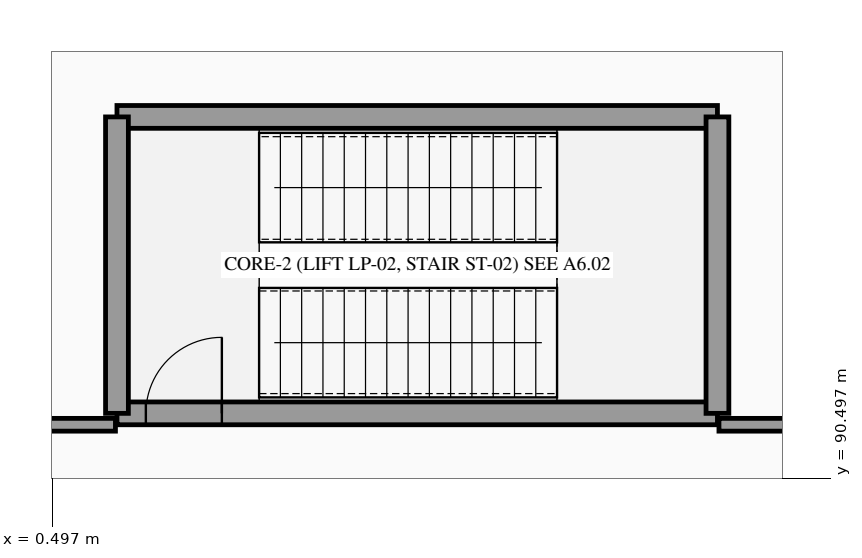
"""IFC4 building model, lengths in metres.
Left out: names, types, materials, properties, quantities, classifications, styles, units other than length and angle.
Written with IfcOpenShell. Run it as: python <this file> out.ifc"""

import sys

from ifc_helpers import new_model, si_unit, direction, frame, frame_2d, origin, place, context, subcontext, project, spatial, rectangle, extrude, element, fill, save


model = new_model("IFC4")
c1 = context("Model", 3, precision=1e-05, world=origin(), true_north=direction((0.0, 1.0)))
c2 = subcontext(c1, "Body", "Model", "MODEL_VIEW")
j1 = project(units=[si_unit("LENGTHUNIT", "METRE"), si_unit("PLANEANGLEUNIT", "RADIAN")], contexts=[c1])
p1 = place(None, origin())
s1 = spatial("IfcSite", under=j1, at=p1, CompositionType="ELEMENT")
p2 = place(p1, origin())
s2 = spatial("IfcBuilding", under=s1, at=p2, CompositionType="ELEMENT")
p3 = place(p2, origin())
s3 = spatial("IfcBuildingStorey", under=s2, at=p3, CompositionType="ELEMENT", Elevation=0.0)
p4 = place(p3, frame((1.35, 91.35, 0.0), z_axis=(0.0, 0.0, 1.0), x_axis=(1.0, 0.0, 0.0)))
e1 = element("IfcWall", 1, at=p4, inside=s3, PredefinedType="SHEAR", context=c2, shape_type="SweptSolid", body=[
    extrude(rectangle(XDim=7.9, YDim=0.3, at=frame_2d((3.95, 0.0))), origin(), (0.0, 0.0, 1.0), 5.4),
])
p5 = place(p4, frame((0.38, 0.0, 0.0)))
e2 = element("IfcOpeningElement", 2, at=p5, cuts=e1, PredefinedType="OPENING", context=c2, shape_type="SweptSolid", body=[
    extrude(rectangle(XDim=1.0, YDim=2.15, at=frame_2d((0.5, 1.075))), frame((0.0, 0.16, 0.0), z_axis=(0.0, -1.0, 0.0), x_axis=(1.0, 0.0, 0.0)), (0.0, 0.0, 1.0), 0.32),
])
p6 = place(p3, frame((1.35, 95.25, 0.0), z_axis=(0.0, 0.0, 1.0), x_axis=(1.0, 0.0, 0.0)))
e3 = element("IfcWall", 3, at=p6, inside=s3, PredefinedType="SHEAR", context=c2, shape_type="SweptSolid", body=[
    extrude(rectangle(XDim=7.9, YDim=0.3, at=frame_2d((3.95, 0.0))), origin(), (0.0, 0.0, 1.0), 5.4),
])
for number, where, z_axis, x_axis in (
    (4, (1.35, 91.35, 0.0), (0.0, 0.0, 1.0), (0.0, 1.0, 0.0)),
    (5, (9.25, 91.35, 0.0), (0.0, 0.0, 1.0), (0.0, 1.0, 0.0)),
):
    element("IfcWall", number, at=place(p3, frame(where, z_axis=z_axis, x_axis=x_axis)), inside=s3, PredefinedType="SHEAR", context=c2, shape_type="SweptSolid", body=[
        extrude(rectangle(XDim=3.9, YDim=0.3, at=frame_2d((1.95, 0.0))), origin(), (0.0, 0.0, 1.0), 5.4),
    ])
p7 = place(p3, frame((0.0, 91.2, 0.0), z_axis=(0.0, 0.0, 1.0), x_axis=(1.0, 0.0, 0.0)))
e6 = element("IfcWall", 6, at=p7, inside=s3, PredefinedType="PARTITIONING", context=c2, shape_type="SweptSolid", body=[
    extrude(rectangle(XDim=1.33, YDim=0.168, at=frame_2d((0.665, 0.0))), origin(), (0.0, 0.0, 1.0), 3.95),
])
p8 = place(p3, frame((9.27, 91.2, 0.0), z_axis=(0.0, 0.0, 1.0), x_axis=(1.0, 0.0, 0.0)))
e7 = element("IfcWall", 7, at=p8, inside=s3, PredefinedType="PARTITIONING", context=c2, shape_type="SweptSolid", body=[
    extrude(rectangle(XDim=5.41, YDim=0.168, at=frame_2d((2.705, 0.0))), origin(), (0.0, 0.0, 1.0), 3.95),
])
p9 = place(p5, origin())
e8 = element("IfcDoor", 8, at=p9, inside=s3, OperationType="SINGLE_SWING_RIGHT", PredefinedType="DOOR", context=c2, shape_type="SweptSolid", body=[
    extrude(rectangle(XDim=1.0, YDim=2.15, at=frame_2d((0.5, 1.075))), frame((0.0, 0.025, 0.0), z_axis=(0.0, -1.0, 0.0), x_axis=(1.0, 0.0, 0.0)), (0.0, 0.0, 1.0), 0.05),
])
fill(e2, e8)
save(model, sys.argv[1])
